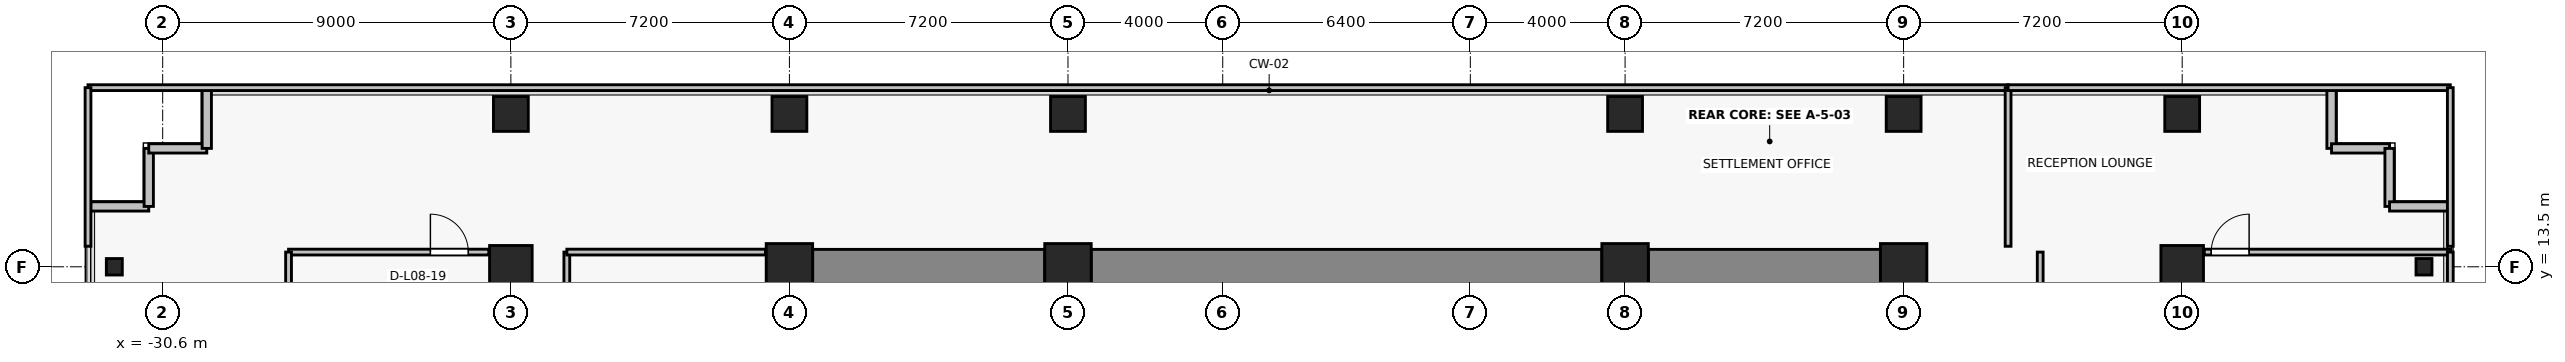
"""IFC4 building model, lengths in metres.
Left out: names, types, materials, properties, quantities, classifications, styles, units other than length and angle.
Written with IfcOpenShell. Run it as: python <this file> out.ifc"""

import sys

from ifc_helpers import new_model, si_unit, direction, frame, frame_2d, origin, origin_2d, place, context, subcontext, project, spatial, rectangle, i_section, extrude, source, transform, mapped, element, fill, save


model = new_model("IFC4")
c1 = context("Model", 3, precision=1e-05, world=origin(), true_north=direction((0.0, 1.0)))
c2 = subcontext(c1, "Body", "Model", "MODEL_VIEW")
j1 = project(units=[si_unit("LENGTHUNIT", "METRE"), si_unit("PLANEANGLEUNIT", "RADIAN")], contexts=[c1])
p1 = place(None, origin())
s1 = spatial("IfcSite", under=j1, at=p1, CompositionType="ELEMENT")
p2 = place(p1, origin())
s2 = spatial("IfcBuilding", under=s1, at=p2, CompositionType="ELEMENT")
p3 = place(p2, frame((0.0, 0.0, 34.0)))
s3 = spatial("IfcBuildingStorey", under=s2, at=p3, CompositionType="ELEMENT", Elevation=34.0)
for number, where, z_axis, x_axis in (
    (1, (-14.4, 13.5, 0.0), (0.0, 0.0, 1.0), (1.0, 0.0, 0.0)),
    (2, (-7.2, 13.5, 0.0), (0.0, 0.0, 1.0), (1.0, 0.0, 0.0)),
    (3, (7.2, 13.5, 0.0), (0.0, 0.0, 1.0), (1.0, 0.0, 0.0)),
    (4, (14.4, 13.5, 0.0), (0.0, 0.0, 1.0), (1.0, 0.0, 0.0)),
):
    element("IfcColumn", number, at=place(p3, frame(where, z_axis=z_axis, x_axis=x_axis)), inside=s3, PredefinedType="COLUMN", context=c2, shape_type="SweptSolid", body=[
        extrude(rectangle(XDim=1.2, YDim=1.2, at=origin_2d()), origin(), (0.0, 0.0, 1.0), 3.3),
    ])
for number, where, z_axis, x_axis in (
    (5, (-21.6, 13.5, 0.0), (0.0, 0.0, 1.0), (1.0, 0.0, 0.0)),
    (6, (21.6, 13.5, 0.0), (0.0, 0.0, 1.0), (1.0, 0.0, 0.0)),
):
    element("IfcColumn", number, at=place(p3, frame(where, z_axis=z_axis, x_axis=x_axis)), inside=s3, PredefinedType="COLUMN", context=c2, shape_type="SweptSolid", body=[
        extrude(rectangle(XDim=1.1, YDim=1.1, at=origin_2d()), origin(), (0.0, 0.0, 1.0), 3.3),
    ])
for number, where, z_axis, x_axis in (
    (7, (-14.4, 17.45, 0.0), (0.0, 0.0, 1.0), (1.0, 0.0, 0.0)),
    (8, (-7.2, 17.45, 0.0), (0.0, 0.0, 1.0), (1.0, 0.0, 0.0)),
    (9, (7.2, 17.45, 0.0), (0.0, 0.0, 1.0), (1.0, 0.0, 0.0)),
    (10, (14.4, 17.45, 0.0), (0.0, 0.0, 1.0), (1.0, 0.0, 0.0)),
    (11, (-21.6, 17.45, 0.0), (0.0, 0.0, 1.0), (1.0, 0.0, 0.0)),
    (12, (21.6, 17.45, 0.0), (0.0, 0.0, 1.0), (1.0, 0.0, 0.0)),
):
    element("IfcColumn", number, at=place(p3, frame(where, z_axis=z_axis, x_axis=x_axis)), inside=s3, PredefinedType="COLUMN", context=c2, shape_type="SweptSolid", body=[
        extrude(rectangle(XDim=0.9, YDim=0.9, at=origin_2d()), origin(), (0.0, 0.0, 1.0), 3.3),
    ])
for number, where, z_axis, x_axis in (
    (13, (-31.85, 13.5, 0.0), (0.0, 0.0, 1.0), (1.0, 0.0, 0.0)),
    (14, (27.85, 13.5, 0.0), (0.0, 0.0, 1.0), (1.0, 0.0, 0.0)),
):
    element("IfcColumn", number, at=place(p3, frame(where, z_axis=z_axis, x_axis=x_axis)), inside=s3, PredefinedType="COLUMN", context=c2, shape_type="SweptSolid", body=[
        extrude(i_section(OverallWidth=0.412, OverallDepth=0.425, WebThickness=0.026, FlangeThickness=0.039, FilletRadius=0.015, at=origin_2d()), origin(), (0.0, 0.0, 1.0), 3.3),
    ])
p4 = place(p3, frame((-13.8, 13.5, 0.0), z_axis=(0.0, 0.0, 1.0), x_axis=(1.0, 0.0, 0.0)))
e15 = element("IfcWall", 15, at=p4, inside=s3, PredefinedType="SHEAR", context=c2, shape_type="SweptSolid", body=[
    extrude(rectangle(XDim=6.0, YDim=0.9, at=frame_2d((3.0, 0.0))), origin(), (0.0, 0.0, 1.0), 3.075),
])
p5 = place(p3, frame((-6.6, 13.5, 0.0), z_axis=(0.0, 0.0, 1.0), x_axis=(1.0, 0.0, 0.0)))
e16 = element("IfcWall", 16, at=p5, inside=s3, PredefinedType="SHEAR", context=c2, shape_type="SweptSolid", body=[
    extrude(rectangle(XDim=13.2, YDim=0.9, at=frame_2d((6.6, 0.0))), origin(), (0.0, 0.0, 1.0), 3.075),
])
p6 = place(p3, frame((7.8, 13.5, 0.0), z_axis=(0.0, 0.0, 1.0), x_axis=(1.0, 0.0, 0.0)))
e17 = element("IfcWall", 17, at=p6, inside=s3, PredefinedType="SHEAR", context=c2, shape_type="SweptSolid", body=[
    extrude(rectangle(XDim=6.0, YDim=0.9, at=frame_2d((3.0, 0.0))), origin(), (0.0, 0.0, 1.0), 3.075),
])
for number, where, z_axis, x_axis in (
    (18, (-30.96, 15.06, 0.0), (0.0, 0.0, 1.0), (-1.0, 0.0, 0.0)),
    (19, (-30.96, 16.56, 0.0), (0.0, 0.0, 1.0), (0.0, -1.0, 0.0)),
    (20, (-29.46, 16.56, 0.0), (0.0, 0.0, 1.0), (-1.0, 0.0, 0.0)),
    (21, (-29.46, 18.06, 0.0), (0.0, 0.0, 1.0), (0.0, -1.0, 0.0)),
    (22, (25.46, 16.56, 0.0), (0.0, 0.0, 1.0), (0.0, 1.0, 0.0)),
    (23, (26.96, 16.56, 0.0), (0.0, 0.0, 1.0), (-1.0, 0.0, 0.0)),
    (24, (26.96, 15.06, 0.0), (0.0, 0.0, 1.0), (0.0, 1.0, 0.0)),
    (25, (28.46, 15.06, 0.0), (0.0, 0.0, 1.0), (-1.0, 0.0, 0.0)),
):
    element("IfcWall", number, at=place(p3, frame(where, z_axis=z_axis, x_axis=x_axis)), inside=s3, PredefinedType="SOLIDWALL", context=c2, shape_type="SweptSolid", body=[
        extrude(rectangle(XDim=1.5, YDim=0.24, at=frame_2d((0.75, 0.0))), origin(), (0.0, 0.0, 1.0), 3.075),
    ])
p7 = place(p3, frame((-27.346, 13.88, 0.0), z_axis=(0.0, 0.0, 1.0), x_axis=(1.0, 0.0, 0.0)))
e26 = element("IfcWall", 26, at=p7, inside=s3, PredefinedType="PARTITIONING", context=c2, shape_type="SweptSolid", body=[
    extrude(rectangle(XDim=5.177, YDim=0.15, at=frame_2d((2.588, 0.0))), origin(), (0.0, 0.0, 1.0), 3.075),
])
p8 = place(p7, frame((3.667, 0.0, 0.0)))
e27 = element("IfcOpeningElement", 27, at=p8, cuts=e26, PredefinedType="OPENING", context=c2, shape_type="SweptSolid", body=[
    extrude(rectangle(XDim=0.98, YDim=2.15, at=frame_2d((0.49, 1.075))), frame((0.0, 0.085, 0.0), z_axis=(0.0, -1.0, 0.0), x_axis=(1.0, 0.0, 0.0)), (0.0, 0.0, 1.0), 0.17),
])
for number, where, z_axis, x_axis in (
    (28, (-27.346, -1.77, 0.0), (0.0, 0.0, 1.0), (0.0, 1.0, 0.0)),
    (29, (-20.154, 13.88, 0.0), (0.0, 0.0, 1.0), (0.0, -1.0, 0.0)),
):
    element("IfcWall", number, at=place(p3, frame(where, z_axis=z_axis, x_axis=x_axis)), inside=s3, PredefinedType="PARTITIONING", context=c2, shape_type="SweptSolid", body=[
        extrude(rectangle(XDim=15.65, YDim=0.15, at=frame_2d((7.825, 0.0))), origin(), (0.0, 0.0, 1.0), 2.465),
    ])
p9 = place(p3, frame((-20.154, 13.88, 0.0), z_axis=(0.0, 0.0, 1.0), x_axis=(1.0, 0.0, 0.0)))
e30 = element("IfcWall", 30, at=p9, inside=s3, PredefinedType="PARTITIONING", context=c2, shape_type="SweptSolid", body=[
    extrude(rectangle(XDim=5.134, YDim=0.15, at=frame_2d((2.567, 0.0))), origin(), (0.0, 0.0, 1.0), 3.075),
])
p10 = place(p3, frame((22.17, 13.88, 0.0), z_axis=(0.0, 0.0, 1.0), x_axis=(1.0, 0.0, 0.0)))
e31 = element("IfcWall", 31, at=p10, inside=s3, PredefinedType="PARTITIONING", context=c2, shape_type="SweptSolid", body=[
    extrude(rectangle(XDim=6.36, YDim=0.15, at=frame_2d((3.18, 0.0))), origin(), (0.0, 0.0, 1.0), 3.075),
])
p11 = place(p10, frame((0.18, 0.0, 0.0)))
e32 = element("IfcOpeningElement", 32, at=p11, cuts=e31, PredefinedType="OPENING", context=c2, shape_type="SweptSolid", body=[
    extrude(rectangle(XDim=0.98, YDim=2.15, at=frame_2d((0.49, 1.075))), frame((0.0, 0.085, 0.0), z_axis=(0.0, -1.0, 0.0), x_axis=(1.0, 0.0, 0.0)), (0.0, 0.0, 1.0), 0.17),
])
p12 = place(p3, frame((17.93, 7.333, 0.0), z_axis=(0.0, 0.0, 1.0), x_axis=(0.0, 1.0, 0.0)))
e33 = element("IfcWall", 33, at=p12, inside=s3, PredefinedType="PARTITIONING", context=c2, shape_type="SweptSolid", body=[
    extrude(rectangle(XDim=6.547, YDim=0.15, at=frame_2d((3.274, 0.0))), origin(), (0.0, 0.0, 1.0), 2.465),
])
p13 = place(p12, frame((2.783, 0.0, 0.0)))
e34 = element("IfcOpeningElement", 34, at=p13, cuts=e33, PredefinedType="OPENING", context=c2, shape_type="SweptSolid", body=[
    extrude(rectangle(XDim=0.98, YDim=2.15, at=frame_2d((0.49, 1.075))), frame((0.0, 0.085, 0.0), z_axis=(0.0, -1.0, 0.0), x_axis=(1.0, 0.0, 0.0)), (0.0, 0.0, 1.0), 0.17),
])
p14 = place(p3, frame((28.53, 13.88, 0.0), z_axis=(0.0, 0.0, 1.0), x_axis=(0.0, -1.0, 0.0)))
e35 = element("IfcWall", 35, at=p14, inside=s3, PredefinedType="PARTITIONING", context=c2, shape_type="SweptSolid", body=[
    extrude(rectangle(XDim=6.547, YDim=0.15, at=frame_2d((3.274, 0.0))), origin(), (0.0, 0.0, 1.0), 3.075),
])
p15 = place(p3, frame((-32.53, 18.13, 0.0), z_axis=(0.0, 0.0, 1.0), x_axis=(1.0, 0.0, 0.0)))
e36 = element("IfcWall", 36, at=p15, inside=s3, PredefinedType="PARTITIONING", context=c2, shape_type="SweptSolid", body=[
    extrude(rectangle(XDim=49.63, YDim=0.15, at=frame_2d((24.815, 0.0))), origin(), (0.0, 0.0, 1.0), 3.075),
])
p16 = place(p3, frame((-32.53, 14.03, 0.0), z_axis=(0.0, 0.0, 1.0), x_axis=(0.0, 1.0, 0.0)))
e37 = element("IfcWall", 37, at=p16, inside=s3, PredefinedType="PARTITIONING", context=c2, shape_type="SweptSolid", body=[
    extrude(rectangle(XDim=4.1, YDim=0.15, at=frame_2d((2.05, 0.0))), origin(), (0.0, 0.0, 1.0), 3.075),
])
p17 = place(p3, frame((17.1, 18.13, 0.0), z_axis=(0.0, 0.0, 1.0), x_axis=(0.0, -1.0, 0.0)))
e38 = element("IfcWall", 38, at=p17, inside=s3, PredefinedType="PARTITIONING", context=c2, shape_type="SweptSolid", body=[
    extrude(rectangle(XDim=4.1, YDim=0.15, at=frame_2d((2.05, 0.0))), origin(), (0.0, 0.0, 1.0), 2.465),
])
p18 = place(p3, frame((17.1, 18.13, 0.0), z_axis=(0.0, 0.0, 1.0), x_axis=(1.0, 0.0, 0.0)))
e39 = element("IfcWall", 39, at=p18, inside=s3, PredefinedType="PARTITIONING", context=c2, shape_type="SweptSolid", body=[
    extrude(rectangle(XDim=11.43, YDim=0.15, at=frame_2d((5.715, 0.0))), origin(), (0.0, 0.0, 1.0), 3.075),
])
p19 = place(p3, frame((28.53, 18.13, 0.0), z_axis=(0.0, 0.0, 1.0), x_axis=(0.0, -1.0, 0.0)))
e40 = element("IfcWall", 40, at=p19, inside=s3, PredefinedType="PARTITIONING", context=c2, shape_type="SweptSolid", body=[
    extrude(rectangle(XDim=4.1, YDim=0.15, at=frame_2d((2.05, 0.0))), origin(), (0.0, 0.0, 1.0), 3.075),
])
m1 = source(origin(), c2, "Body", "SweptSolid", [
    extrude(rectangle(XDim=0.98, YDim=2.15, at=frame_2d((0.49, 1.075))), frame((0.0, 0.025, 0.0), z_axis=(0.0, -1.0, 0.0), x_axis=(1.0, 0.0, 0.0)), (0.0, 0.0, 1.0), 0.05),
])
p20 = place(p8, origin())
e41 = element("IfcDoor", 41, at=p20, inside=s3, OperationType="SINGLE_SWING_LEFT", PredefinedType="DOOR", context=c2, shape_type="MappedRepresentation", body=[
    mapped(m1, transform((0.0, 0.0, 0.0), x_axis=(1.0, 0.0, 0.0), y_axis=(0.0, 1.0, 0.0), z_axis=(0.0, 0.0, 1.0), scale=1.0)),
])
fill(e27, e41)
p21 = place(p11, origin())
e42 = element("IfcDoor", 42, at=p21, inside=s3, OperationType="SINGLE_SWING_RIGHT", PredefinedType="DOOR", context=c2, shape_type="MappedRepresentation", body=[
    mapped(m1, transform((0.0, 0.0, 0.0), x_axis=(1.0, 0.0, 0.0), y_axis=(0.0, 1.0, 0.0), z_axis=(0.0, 0.0, 1.0), scale=1.0)),
])
fill(e32, e42)
save(model, sys.argv[1])
